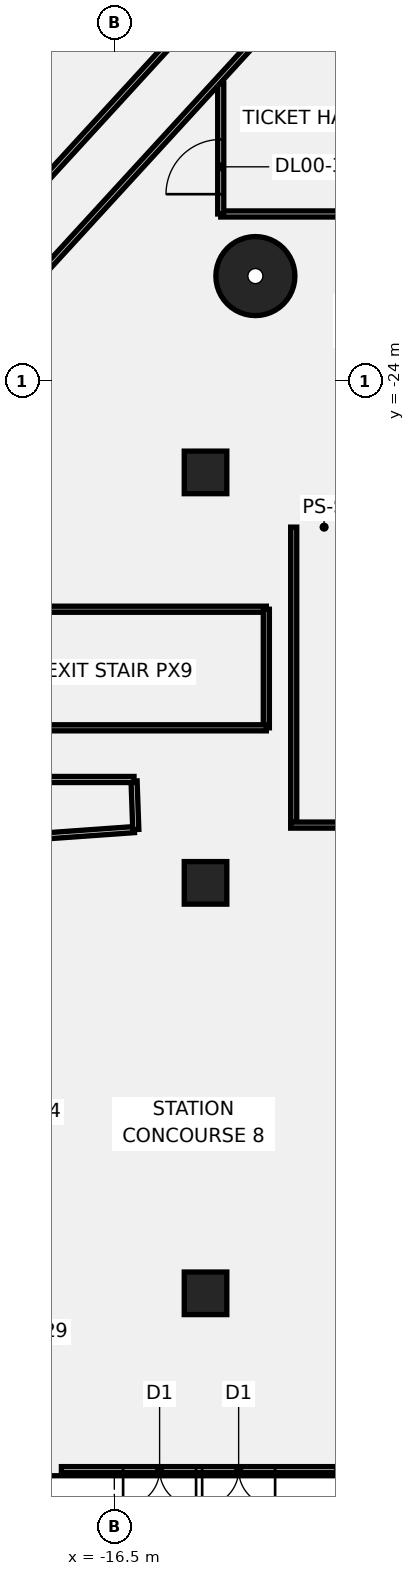
"""IFC4 building model, lengths in metres.
Left out: names, types, materials, properties, quantities, classifications, styles, units other than length and angle.
Written with IfcOpenShell. Run it as: python <this file> out.ifc"""

import sys

from ifc_helpers import new_model, si_unit, direction, frame, frame_2d, origin, origin_2d, place, context, subcontext, project, spatial, rectangle, circle, extrude, element, fill, save


model = new_model("IFC4")
c1 = context("Model", 3, precision=1e-05, world=origin(), true_north=direction((0.0, 1.0)))
c2 = subcontext(c1, "Body", "Model", "MODEL_VIEW")
j1 = project(units=[si_unit("LENGTHUNIT", "METRE"), si_unit("PLANEANGLEUNIT", "RADIAN")], contexts=[c1])
p1 = place(None, origin())
s1 = spatial("IfcSite", under=j1, at=p1, CompositionType="ELEMENT")
p2 = place(p1, origin())
s2 = spatial("IfcBuilding", under=s1, at=p2, CompositionType="ELEMENT")
p3 = place(p2, origin())
s3 = spatial("IfcBuildingStorey", under=s2, at=p3, CompositionType="ELEMENT", Elevation=0.0)
p4 = place(p3, frame((-11.86, -20.543, -0.55), z_axis=(0.0, 0.0, 1.0), x_axis=(1.0, 0.0, 0.0)))
e1 = element("IfcColumn", 1, at=p4, inside=s3, PredefinedType="COLUMN", context=c2, shape_type="SweptSolid", body=[
    extrude(circle(Radius=1.3, at=origin_2d()), origin(), (0.0, 0.0, 1.0), 9.05),
])
for number, where, z_axis, x_axis in (
    (2, (-13.5, -54.0, -0.55), (0.0, 0.0, 1.0), (1.0, 0.0, 0.0)),
    (3, (-13.5, -40.5, -0.55), (0.0, 0.0, 1.0), (1.0, 0.0, 0.0)),
    (4, (-13.5, -27.0, -0.55), (0.0, 0.0, 1.0), (1.0, 0.0, 0.0)),
):
    element("IfcColumn", number, at=place(p3, frame(where, z_axis=z_axis, x_axis=x_axis)), inside=s3, PredefinedType="COLUMN", context=c2, shape_type="SweptSolid", body=[
        extrude(rectangle(XDim=1.4, YDim=1.4, at=origin_2d()), origin(), (0.0, 0.0, 1.0), 9.05),
    ])
p5 = place(p3, frame((-23.0, -31.5, 0.0), z_axis=(0.0, 0.0, 1.0), x_axis=(1.0, 0.0, 0.0)))
e5 = element("IfcWall", 5, at=p5, inside=s3, PredefinedType="PARTITIONING", context=c2, shape_type="SweptSolid", body=[
    extrude(rectangle(XDim=11.5, YDim=0.2, at=frame_2d((5.75, 0.0))), origin(), (0.0, 0.0, 1.0), 8.5),
])
p6 = place(p3, frame((-11.5, -35.4, 0.0), z_axis=(0.0, 0.0, 1.0), x_axis=(0.0, 1.0, 0.0)))
e6 = element("IfcWall", 6, at=p6, inside=s3, PredefinedType="PARTITIONING", context=c2, shape_type="SweptSolid", body=[
    extrude(rectangle(XDim=3.9, YDim=0.2, at=frame_2d((1.95, 0.0))), origin(), (0.0, 0.0, 1.0), 8.5),
])
p7 = place(p3, frame((-23.0, -35.4, 0.0), z_axis=(0.0, 0.0, 1.0), x_axis=(1.0, 0.0, 0.0)))
e7 = element("IfcWall", 7, at=p7, inside=s3, PredefinedType="PARTITIONING", context=c2, shape_type="SweptSolid", body=[
    extrude(rectangle(XDim=11.5, YDim=0.2, at=frame_2d((5.75, 0.0))), origin(), (0.0, 0.0, 1.0), 8.5),
])
p8 = place(p7, frame((0.352, 0.0, 0.0)))
e8 = element("IfcOpeningElement", 8, at=p8, cuts=e7, PredefinedType="OPENING", context=c2, shape_type="SweptSolid", body=[
    extrude(rectangle(XDim=1.2, YDim=2.1, at=frame_2d((0.6, 1.05))), frame((0.0, 0.11, 0.0), z_axis=(0.0, -1.0, 0.0), x_axis=(1.0, 0.0, 0.0)), (0.0, 0.0, 1.0), 0.22),
])
p9 = place(p3, frame((-13.0, -18.5, 0.0), z_axis=(0.0, 0.0, 1.0), x_axis=(1.0, 0.0, 0.0)))
e9 = element("IfcWall", 9, at=p9, inside=s3, PredefinedType="PARTITIONING", context=c2, shape_type="SweptSolid", body=[
    extrude(rectangle(XDim=5.5, YDim=0.2, at=frame_2d((2.75, 0.0))), origin(), (0.0, 0.0, 1.0), 8.5),
])
p10 = place(p3, frame((-13.0, -18.5, 0.0), z_axis=(0.0, 0.0, 1.0), x_axis=(0.0, 1.0, 0.0)))
e10 = element("IfcWall", 10, at=p10, inside=s3, PredefinedType="PARTITIONING", context=c2, shape_type="SweptSolid", body=[
    extrude(rectangle(XDim=4.292, YDim=0.2, at=frame_2d((2.146, 0.0))), origin(), (0.0, 0.0, 1.0), 8.5),
])
p11 = place(p10, frame((0.651, 0.0, 0.0)))
e11 = element("IfcOpeningElement", 11, at=p11, cuts=e10, PredefinedType="OPENING", context=c2, shape_type="SweptSolid", body=[
    extrude(rectangle(XDim=1.8, YDim=2.1, at=frame_2d((0.9, 1.05))), frame((0.0, 0.11, 0.0), z_axis=(0.0, -1.0, 0.0), x_axis=(1.0, 0.0, 0.0)), (0.0, 0.0, 1.0), 0.22),
])
p12 = place(p3, frame((-12.01, -12.95, 0.0), z_axis=(0.0, 0.0, 1.0), x_axis=(-0.675727545108, -0.737151466648, 0.0)))
e12 = element("IfcWall", 12, at=p12, inside=s3, PredefinedType="PARTITIONING", context=c2, shape_type="SweptSolid", body=[
    extrude(rectangle(XDim=11.372, YDim=0.2, at=frame_2d((5.686, 0.0))), origin(), (0.0, 0.0, 1.0), 8.5),
])
p13 = place(p3, frame((-12.89, -10.95, 0.0), z_axis=(0.0, 0.0, 1.0), x_axis=(-0.675720358886, -0.737158054007, 0.0)))
e13 = element("IfcWall", 13, at=p13, inside=s3, PredefinedType="PARTITIONING", context=c2, shape_type="SweptSolid", body=[
    extrude(rectangle(XDim=12.947, YDim=0.2, at=frame_2d((6.473, 0.0))), origin(), (0.0, 0.0, 1.0), 8.5),
])
p14 = place(p3, frame((-23.225, -39.274, 0.0), z_axis=(0.0, 0.0, 1.0), x_axis=(0.997476420844, 0.070998520131, 0.0)))
e14 = element("IfcWall", 14, at=p14, inside=s3, PredefinedType="PARTITIONING", context=c2, shape_type="SweptSolid", body=[
    extrude(rectangle(XDim=7.4, YDim=0.2, at=frame_2d((3.7, 0.0))), origin(), (0.0, 0.0, 1.0), 8.5),
])
p15 = place(p3, frame((-15.794, -38.745, 0.0), z_axis=(0.0, 0.0, 1.0), x_axis=(-0.035489644916, 0.99937004413, 0.0)))
e15 = element("IfcWall", 15, at=p15, inside=s3, PredefinedType="PARTITIONING", context=c2, shape_type="SweptSolid", body=[
    extrude(rectangle(XDim=1.596, YDim=0.2, at=frame_2d((0.798, 0.0))), origin(), (0.0, 0.0, 1.0), 8.5),
])
p16 = place(p3, frame((-15.852, -37.1, 0.0), z_axis=(0.0, 0.0, 1.0), x_axis=(-1.0, 0.0, 0.0)))
e16 = element("IfcWall", 16, at=p16, inside=s3, PredefinedType="PARTITIONING", context=c2, shape_type="SweptSolid", body=[
    extrude(rectangle(XDim=5.373, YDim=0.2, at=frame_2d((2.687, 0.0))), origin(), (0.0, 0.0, 1.0), 8.5),
])
p17 = place(p3, frame((-18.1, 5.453, 0.0), z_axis=(0.0, 0.0, 1.0), x_axis=(-0.33089272618, -0.943668375946, 0.0)))
e17 = element("IfcWall", 17, at=p17, inside=s3, PredefinedType="PARTITIONING", context=c2, shape_type="SweptSolid", body=[
    extrude(rectangle(XDim=19.931, YDim=0.2, at=frame_2d((9.965, 0.0))), origin(), (0.0, 0.0, 1.0), 8.5),
])
p18 = place(p3, frame((-10.6, -28.8, 0.0), z_axis=(0.0, 0.0, 1.0), x_axis=(0.0, -1.0, 0.0)))
e18 = element("IfcWall", 18, at=p18, inside=s3, PredefinedType="SOLIDWALL", context=c2, shape_type="SweptSolid", body=[
    extrude(rectangle(XDim=9.7, YDim=0.2, at=frame_2d((4.85, 0.0))), origin(), (0.0, 0.0, 1.0), 8.5),
])
p19 = place(p3, frame((-10.7, -38.6, 0.0), z_axis=(0.0, 0.0, 1.0), x_axis=(1.0, 0.0, 0.0)))
e19 = element("IfcWall", 19, at=p19, inside=s3, PredefinedType="SOLIDWALL", context=c2, shape_type="SweptSolid", body=[
    extrude(rectangle(XDim=4.3, YDim=0.2, at=frame_2d((2.15, 0.0))), origin(), (0.0, 0.0, 1.0), 8.5),
])
p20 = place(p3, frame((-18.241, -59.8, 0.0), z_axis=(0.0, 0.0, 1.0), x_axis=(1.0, 0.0, 0.0)))
e20 = element("IfcWall", 20, at=p20, inside=s3, PredefinedType="SOLIDWALL", context=c2, shape_type="SweptSolid", body=[
    extrude(rectangle(XDim=9.061, YDim=0.2, at=frame_2d((4.53, 0.0))), origin(), (0.0, 0.0, 1.0), 2.9),
])
p21 = place(p20, frame((2.03, 0.0, 0.0)))
e21 = element("IfcOpeningElement", 21, at=p21, cuts=e20, PredefinedType="OPENING", context=c2, shape_type="SweptSolid", body=[
    extrude(rectangle(XDim=2.4, YDim=2.4, at=frame_2d((1.2, 1.2))), frame((0.0, 0.11, 0.0), z_axis=(0.0, -1.0, 0.0), x_axis=(1.0, 0.0, 0.0)), (0.0, 0.0, 1.0), 0.22),
])
p22 = place(p20, frame((4.63, 0.0, 0.0)))
e22 = element("IfcOpeningElement", 22, at=p22, cuts=e20, PredefinedType="OPENING", context=c2, shape_type="SweptSolid", body=[
    extrude(rectangle(XDim=2.4, YDim=2.4, at=frame_2d((1.2, 1.2))), frame((0.0, 0.11, 0.0), z_axis=(0.0, -1.0, 0.0), x_axis=(1.0, 0.0, 0.0)), (0.0, 0.0, 1.0), 0.22),
])
p23 = place(p11, origin())
e23 = element("IfcDoor", 23, at=p23, inside=s3, OperationType="SINGLE_SWING_LEFT", PredefinedType="DOOR", context=c2, shape_type="SweptSolid", body=[
    extrude(rectangle(XDim=1.8, YDim=2.1, at=frame_2d((0.9, 1.05))), frame((0.0, 0.025, 0.0), z_axis=(0.0, -1.0, 0.0), x_axis=(1.0, 0.0, 0.0)), (0.0, 0.0, 1.0), 0.05),
])
fill(e11, e23)
p24 = place(p21, frame((2.4, 0.0, 0.0), z_axis=(0.0, 0.0, 1.0), x_axis=(-1.0, 0.0, 0.0)))
e24 = element("IfcDoor", 24, at=p24, inside=s3, OperationType="DOUBLE_DOOR_DOUBLE_SWING", PredefinedType="DOOR", context=c2, shape_type="SweptSolid", body=[
    extrude(rectangle(XDim=2.4, YDim=2.4, at=frame_2d((1.2, 1.2))), frame((0.0, 0.025, 0.0), z_axis=(0.0, -1.0, 0.0), x_axis=(1.0, 0.0, 0.0)), (0.0, 0.0, 1.0), 0.05),
])
fill(e21, e24)
p25 = place(p22, frame((2.4, 0.0, 0.0), z_axis=(0.0, 0.0, 1.0), x_axis=(-1.0, 0.0, 0.0)))
e25 = element("IfcDoor", 25, at=p25, inside=s3, OperationType="DOUBLE_DOOR_DOUBLE_SWING", PredefinedType="DOOR", context=c2, shape_type="SweptSolid", body=[
    extrude(rectangle(XDim=2.4, YDim=2.4, at=frame_2d((1.2, 1.2))), frame((0.0, 0.025, 0.0), z_axis=(0.0, -1.0, 0.0), x_axis=(1.0, 0.0, 0.0)), (0.0, 0.0, 1.0), 0.05),
])
fill(e22, e25)
save(model, sys.argv[1])
